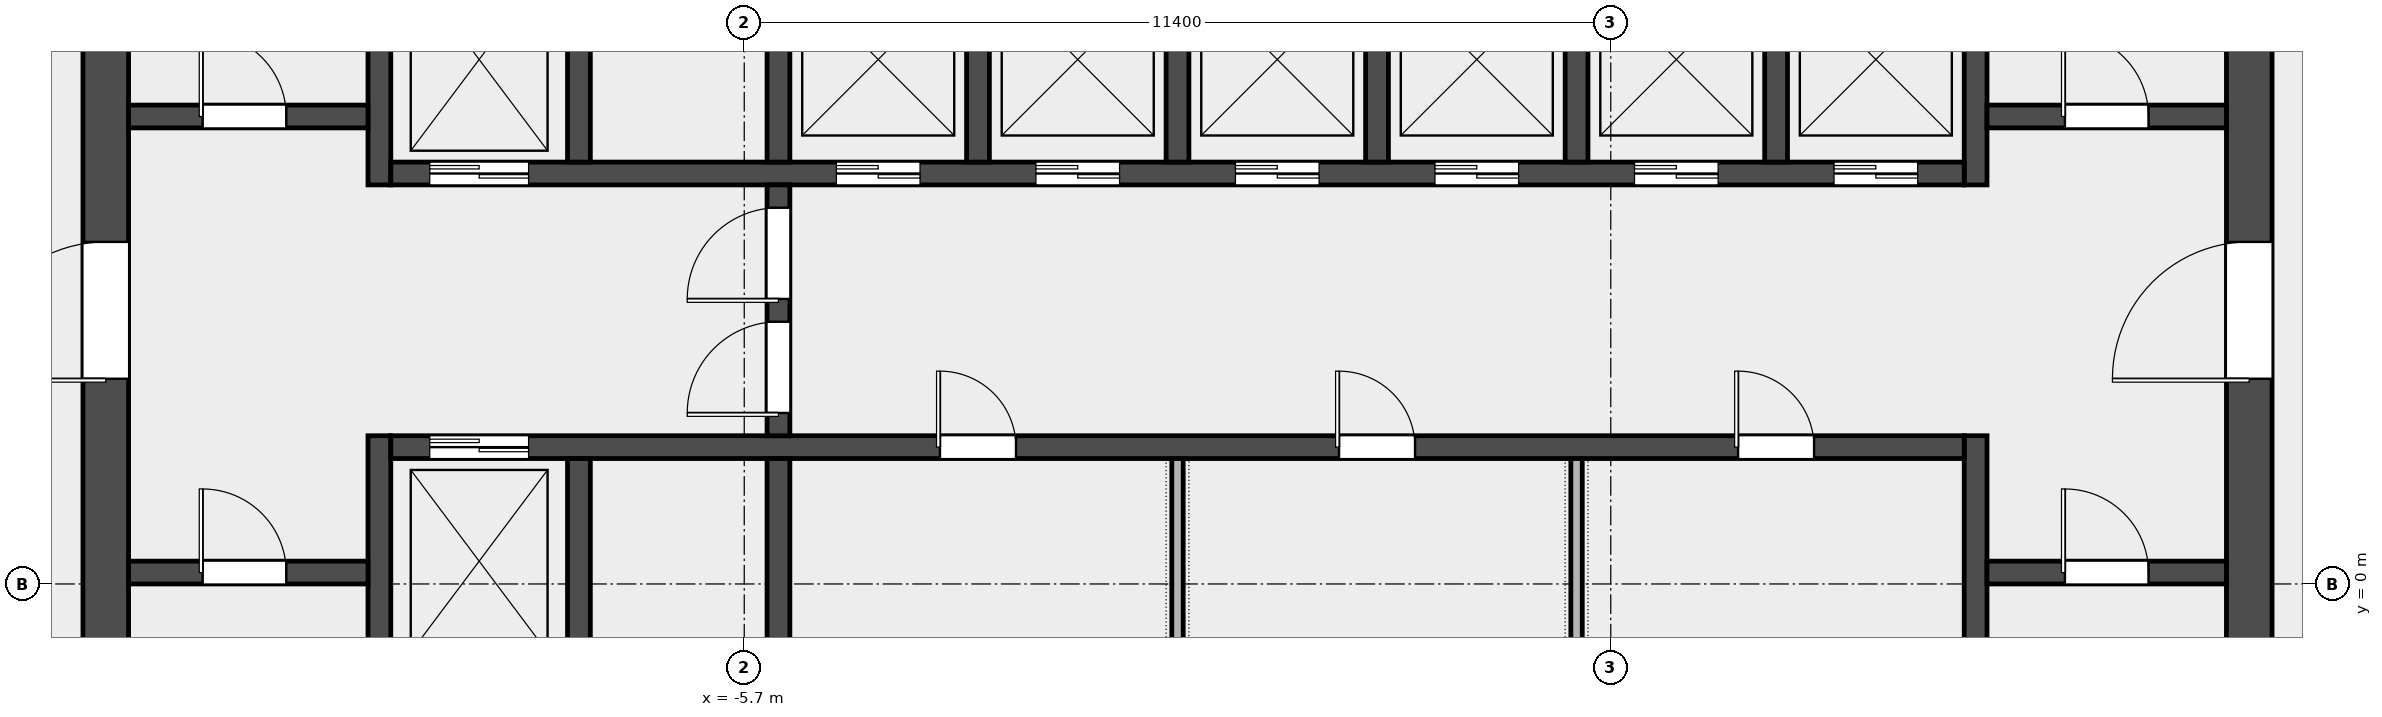
"""IFC4 building model, lengths in metres.
Left out: names, types, materials, properties, quantities, classifications, styles, units other than length and angle.
Written with IfcOpenShell. Run it as: python <this file> out.ifc"""

import sys

from ifc_helpers import new_model, si_unit, direction, frame, frame_2d, origin, place, context, subcontext, project, spatial, rectangle, extrude, element, fill, save


model = new_model("IFC4")
c1 = context("Model", 3, precision=1e-05, world=origin(), true_north=direction((0.0, 1.0)))
c2 = subcontext(c1, "Body", "Model", "MODEL_VIEW")
j1 = project(units=[si_unit("LENGTHUNIT", "METRE"), si_unit("PLANEANGLEUNIT", "RADIAN")], contexts=[c1])
p1 = place(None, origin())
s1 = spatial("IfcSite", under=j1, at=p1, CompositionType="ELEMENT")
p2 = place(p1, origin())
s2 = spatial("IfcBuilding", under=s1, at=p2, CompositionType="ELEMENT")
p3 = place(p2, frame((0.0, 0.0, 275.4)))
s3 = spatial("IfcBuildingStorey", under=s2, at=p3, CompositionType="ELEMENT", Elevation=275.4)
p4 = place(p3, frame((-14.1, -6.6, 0.0), z_axis=(0.0, 0.0, 1.0), x_axis=(0.0, 1.0, 0.0)))
e1 = element("IfcWall", 1, at=p4, inside=s3, PredefinedType="SHEAR", context=c2, shape_type="SweptSolid", body=[
    extrude(rectangle(XDim=19.5, YDim=0.6, at=frame_2d((9.75, 0.0))), origin(), (0.0, 0.0, 1.0), 3.7),
])
p5 = place(p4, frame((9.3, 0.0, 0.0)))
e2 = element("IfcOpeningElement", 2, at=p5, cuts=e1, PredefinedType="OPENING", context=c2, shape_type="SweptSolid", body=[
    extrude(rectangle(XDim=1.8, YDim=2.1, at=frame_2d((0.9, 1.05))), frame((0.0, 0.312, 0.0), z_axis=(0.0, -1.0, 0.0), x_axis=(1.0, 0.0, 0.0)), (0.0, 0.0, 1.0), 0.624),
])
p6 = place(p3, frame((14.1, -6.6, 0.0), z_axis=(0.0, 0.0, 1.0), x_axis=(0.0, 1.0, 0.0)))
e3 = element("IfcWall", 3, at=p6, inside=s3, PredefinedType="SHEAR", context=c2, shape_type="SweptSolid", body=[
    extrude(rectangle(XDim=19.5, YDim=0.6, at=frame_2d((9.75, 0.0))), origin(), (0.0, 0.0, 1.0), 3.7),
])
p7 = place(p6, frame((9.3, 0.0, 0.0)))
e4 = element("IfcOpeningElement", 4, at=p7, cuts=e3, PredefinedType="OPENING", context=c2, shape_type="SweptSolid", body=[
    extrude(rectangle(XDim=1.8, YDim=2.1, at=frame_2d((0.9, 1.05))), frame((0.0, 0.312, 0.0), z_axis=(0.0, -1.0, 0.0), x_axis=(1.0, 0.0, 0.0)), (0.0, 0.0, 1.0), 0.624),
])
p8 = place(p3, frame((-10.5, -6.6, 0.0), z_axis=(0.0, 0.0, 1.0), x_axis=(0.0, 1.0, 0.0)))
e5 = element("IfcWall", 5, at=p8, inside=s3, PredefinedType="SHEAR", context=c2, shape_type="SweptSolid", body=[
    extrude(rectangle(XDim=8.55, YDim=0.3, at=frame_2d((4.275, 0.0))), origin(), (0.0, 0.0, 1.0), 3.7),
])
p9 = place(p3, frame((-10.5, 5.25, 0.0), z_axis=(0.0, 0.0, 1.0), x_axis=(0.0, 1.0, 0.0)))
e6 = element("IfcWall", 6, at=p9, inside=s3, PredefinedType="SHEAR", context=c2, shape_type="SweptSolid", body=[
    extrude(rectangle(XDim=7.65, YDim=0.3, at=frame_2d((3.825, 0.0))), origin(), (0.0, 0.0, 1.0), 3.7),
])
p10 = place(p3, frame((10.5, -6.6, 0.0), z_axis=(0.0, 0.0, 1.0), x_axis=(0.0, 1.0, 0.0)))
e7 = element("IfcWall", 7, at=p10, inside=s3, PredefinedType="SHEAR", context=c2, shape_type="SweptSolid", body=[
    extrude(rectangle(XDim=8.55, YDim=0.3, at=frame_2d((4.275, 0.0))), origin(), (0.0, 0.0, 1.0), 3.7),
])
p11 = place(p3, frame((10.5, 5.25, 0.0), z_axis=(0.0, 0.0, 1.0), x_axis=(0.0, 1.0, 0.0)))
e8 = element("IfcWall", 8, at=p11, inside=s3, PredefinedType="SHEAR", context=c2, shape_type="SweptSolid", body=[
    extrude(rectangle(XDim=7.65, YDim=0.3, at=frame_2d((3.825, 0.0))), origin(), (0.0, 0.0, 1.0), 3.7),
])
p12 = place(p3, frame((-13.8, 0.15, 0.0), z_axis=(0.0, 0.0, 1.0), x_axis=(1.0, 0.0, 0.0)))
e9 = element("IfcWall", 9, at=p12, inside=s3, PredefinedType="SOLIDWALL", context=c2, shape_type="SweptSolid", body=[
    extrude(rectangle(XDim=3.15, YDim=0.3, at=frame_2d((1.575, 0.0))), origin(), (0.0, 0.0, 1.0), 3.7),
])
p13 = place(p12, frame((0.975, 0.0, 0.0)))
e10 = element("IfcOpeningElement", 10, at=p13, cuts=e9, PredefinedType="OPENING", context=c2, shape_type="SweptSolid", body=[
    extrude(rectangle(XDim=1.1, YDim=2.1, at=frame_2d((0.55, 1.05))), frame((0.0, 0.162, 0.0), z_axis=(0.0, -1.0, 0.0), x_axis=(1.0, 0.0, 0.0)), (0.0, 0.0, 1.0), 0.324),
])
p14 = place(p3, frame((-13.8, 6.15, 0.0), z_axis=(0.0, 0.0, 1.0), x_axis=(1.0, 0.0, 0.0)))
e11 = element("IfcWall", 11, at=p14, inside=s3, PredefinedType="SOLIDWALL", context=c2, shape_type="SweptSolid", body=[
    extrude(rectangle(XDim=3.15, YDim=0.3, at=frame_2d((1.575, 0.0))), origin(), (0.0, 0.0, 1.0), 3.7),
])
p15 = place(p14, frame((0.975, 0.0, 0.0)))
e12 = element("IfcOpeningElement", 12, at=p15, cuts=e11, PredefinedType="OPENING", context=c2, shape_type="SweptSolid", body=[
    extrude(rectangle(XDim=1.1, YDim=2.1, at=frame_2d((0.55, 1.05))), frame((0.0, 0.162, 0.0), z_axis=(0.0, -1.0, 0.0), x_axis=(1.0, 0.0, 0.0)), (0.0, 0.0, 1.0), 0.324),
])
p16 = place(p3, frame((10.65, 0.15, 0.0), z_axis=(0.0, 0.0, 1.0), x_axis=(1.0, 0.0, 0.0)))
e13 = element("IfcWall", 13, at=p16, inside=s3, PredefinedType="SOLIDWALL", context=c2, shape_type="SweptSolid", body=[
    extrude(rectangle(XDim=3.15, YDim=0.3, at=frame_2d((1.575, 0.0))), origin(), (0.0, 0.0, 1.0), 3.7),
])
p17 = place(p16, frame((1.025, 0.0, 0.0)))
e14 = element("IfcOpeningElement", 14, at=p17, cuts=e13, PredefinedType="OPENING", context=c2, shape_type="SweptSolid", body=[
    extrude(rectangle(XDim=1.1, YDim=2.1, at=frame_2d((0.55, 1.05))), frame((0.0, 0.162, 0.0), z_axis=(0.0, -1.0, 0.0), x_axis=(1.0, 0.0, 0.0)), (0.0, 0.0, 1.0), 0.324),
])
p18 = place(p3, frame((10.65, 6.15, 0.0), z_axis=(0.0, 0.0, 1.0), x_axis=(1.0, 0.0, 0.0)))
e15 = element("IfcWall", 15, at=p18, inside=s3, PredefinedType="SOLIDWALL", context=c2, shape_type="SweptSolid", body=[
    extrude(rectangle(XDim=3.15, YDim=0.3, at=frame_2d((1.575, 0.0))), origin(), (0.0, 0.0, 1.0), 3.7),
])
p19 = place(p18, frame((1.025, 0.0, 0.0)))
e16 = element("IfcOpeningElement", 16, at=p19, cuts=e15, PredefinedType="OPENING", context=c2, shape_type="SweptSolid", body=[
    extrude(rectangle(XDim=1.1, YDim=2.1, at=frame_2d((0.55, 1.05))), frame((0.0, 0.162, 0.0), z_axis=(0.0, -1.0, 0.0), x_axis=(1.0, 0.0, 0.0)), (0.0, 0.0, 1.0), 0.324),
])
p20 = place(p3, frame((-10.35, 1.8, 0.0), z_axis=(0.0, 0.0, 1.0), x_axis=(1.0, 0.0, 0.0)))
e17 = element("IfcWall", 17, at=p20, inside=s3, PredefinedType="SOLIDWALL", context=c2, shape_type="SweptSolid", body=[
    extrude(rectangle(XDim=20.7, YDim=0.3, at=frame_2d((10.35, 0.0))), origin(), (0.0, 0.0, 1.0), 3.7),
])
p21 = place(p20, frame((0.512, 0.0, 0.0)))
e18 = element("IfcOpeningElement", 18, at=p21, cuts=e17, PredefinedType="OPENING", context=c2, shape_type="SweptSolid", body=[
    extrude(rectangle(XDim=1.3, YDim=2.1, at=frame_2d((0.65, 1.05))), frame((0.0, 0.162, 0.0), z_axis=(0.0, -1.0, 0.0), x_axis=(1.0, 0.0, 0.0)), (0.0, 0.0, 1.0), 0.324),
])
p22 = place(p20, frame((7.225, 0.0, 0.0)))
e19 = element("IfcOpeningElement", 19, at=p22, cuts=e17, PredefinedType="OPENING", context=c2, shape_type="SweptSolid", body=[
    extrude(rectangle(XDim=1.0, YDim=2.1, at=frame_2d((0.5, 1.05))), frame((0.0, 0.162, 0.0), z_axis=(0.0, -1.0, 0.0), x_axis=(1.0, 0.0, 0.0)), (0.0, 0.0, 1.0), 0.324),
])
p23 = place(p20, frame((12.475, 0.0, 0.0)))
e20 = element("IfcOpeningElement", 20, at=p23, cuts=e17, PredefinedType="OPENING", context=c2, shape_type="SweptSolid", body=[
    extrude(rectangle(XDim=1.0, YDim=2.1, at=frame_2d((0.5, 1.05))), frame((0.0, 0.162, 0.0), z_axis=(0.0, -1.0, 0.0), x_axis=(1.0, 0.0, 0.0)), (0.0, 0.0, 1.0), 0.324),
])
p24 = place(p20, frame((17.725, 0.0, 0.0)))
e21 = element("IfcOpeningElement", 21, at=p24, cuts=e17, PredefinedType="OPENING", context=c2, shape_type="SweptSolid", body=[
    extrude(rectangle(XDim=1.0, YDim=2.1, at=frame_2d((0.5, 1.05))), frame((0.0, 0.162, 0.0), z_axis=(0.0, -1.0, 0.0), x_axis=(1.0, 0.0, 0.0)), (0.0, 0.0, 1.0), 0.324),
])
p25 = place(p3, frame((-10.35, 5.4, 0.0), z_axis=(0.0, 0.0, 1.0), x_axis=(1.0, 0.0, 0.0)))
e22 = element("IfcWall", 22, at=p25, inside=s3, PredefinedType="SOLIDWALL", context=c2, shape_type="SweptSolid", body=[
    extrude(rectangle(XDim=20.7, YDim=0.3, at=frame_2d((10.35, 0.0))), origin(), (0.0, 0.0, 1.0), 3.7),
])
p26 = place(p25, frame((0.512, 0.0, 0.0)))
e23 = element("IfcOpeningElement", 23, at=p26, cuts=e22, PredefinedType="OPENING", context=c2, shape_type="SweptSolid", body=[
    extrude(rectangle(XDim=1.3, YDim=2.1, at=frame_2d((0.65, 1.05))), frame((0.0, 0.162, 0.0), z_axis=(0.0, -1.0, 0.0), x_axis=(1.0, 0.0, 0.0)), (0.0, 0.0, 1.0), 0.324),
])
p27 = place(p25, frame((5.863, 0.0, 0.0)))
e24 = element("IfcOpeningElement", 24, at=p27, cuts=e22, PredefinedType="OPENING", context=c2, shape_type="SweptSolid", body=[
    extrude(rectangle(XDim=1.1, YDim=2.1, at=frame_2d((0.55, 1.05))), frame((0.0, 0.162, 0.0), z_axis=(0.0, -1.0, 0.0), x_axis=(1.0, 0.0, 0.0)), (0.0, 0.0, 1.0), 0.324),
])
p28 = place(p25, frame((8.488, 0.0, 0.0)))
e25 = element("IfcOpeningElement", 25, at=p28, cuts=e22, PredefinedType="OPENING", context=c2, shape_type="SweptSolid", body=[
    extrude(rectangle(XDim=1.1, YDim=2.1, at=frame_2d((0.55, 1.05))), frame((0.0, 0.162, 0.0), z_axis=(0.0, -1.0, 0.0), x_axis=(1.0, 0.0, 0.0)), (0.0, 0.0, 1.0), 0.324),
])
p29 = place(p25, frame((11.113, 0.0, 0.0)))
e26 = element("IfcOpeningElement", 26, at=p29, cuts=e22, PredefinedType="OPENING", context=c2, shape_type="SweptSolid", body=[
    extrude(rectangle(XDim=1.1, YDim=2.1, at=frame_2d((0.55, 1.05))), frame((0.0, 0.162, 0.0), z_axis=(0.0, -1.0, 0.0), x_axis=(1.0, 0.0, 0.0)), (0.0, 0.0, 1.0), 0.324),
])
p30 = place(p25, frame((13.738, 0.0, 0.0)))
e27 = element("IfcOpeningElement", 27, at=p30, cuts=e22, PredefinedType="OPENING", context=c2, shape_type="SweptSolid", body=[
    extrude(rectangle(XDim=1.1, YDim=2.1, at=frame_2d((0.55, 1.05))), frame((0.0, 0.162, 0.0), z_axis=(0.0, -1.0, 0.0), x_axis=(1.0, 0.0, 0.0)), (0.0, 0.0, 1.0), 0.324),
])
p31 = place(p25, frame((16.363, 0.0, 0.0)))
e28 = element("IfcOpeningElement", 28, at=p31, cuts=e22, PredefinedType="OPENING", context=c2, shape_type="SweptSolid", body=[
    extrude(rectangle(XDim=1.1, YDim=2.1, at=frame_2d((0.55, 1.05))), frame((0.0, 0.162, 0.0), z_axis=(0.0, -1.0, 0.0), x_axis=(1.0, 0.0, 0.0)), (0.0, 0.0, 1.0), 0.324),
])
p32 = place(p25, frame((18.988, 0.0, 0.0)))
e29 = element("IfcOpeningElement", 29, at=p32, cuts=e22, PredefinedType="OPENING", context=c2, shape_type="SweptSolid", body=[
    extrude(rectangle(XDim=1.1, YDim=2.1, at=frame_2d((0.55, 1.05))), frame((0.0, 0.162, 0.0), z_axis=(0.0, -1.0, 0.0), x_axis=(1.0, 0.0, 0.0)), (0.0, 0.0, 1.0), 0.324),
])
for number, where, z_axis, x_axis in (
    (30, (-7.875, -1.05, 0.0), (0.0, 0.0, 1.0), (0.0, 1.0, 0.0)),
    (31, (-5.25, -1.05, 0.0), (0.0, 0.0, 1.0), (0.0, 1.0, 0.0)),
    (32, (-7.875, 5.55, 0.0), (0.0, 0.0, 1.0), (0.0, 1.0, 0.0)),
    (33, (-5.25, 5.55, 0.0), (0.0, 0.0, 1.0), (0.0, 1.0, 0.0)),
    (34, (-2.625, 5.55, 0.0), (0.0, 0.0, 1.0), (0.0, 1.0, 0.0)),
    (35, (0.0, 5.55, 0.0), (0.0, 0.0, 1.0), (0.0, 1.0, 0.0)),
    (36, (2.625, 5.55, 0.0), (0.0, 0.0, 1.0), (0.0, 1.0, 0.0)),
    (37, (5.25, 5.55, 0.0), (0.0, 0.0, 1.0), (0.0, 1.0, 0.0)),
    (38, (7.875, 5.55, 0.0), (0.0, 0.0, 1.0), (0.0, 1.0, 0.0)),
):
    element("IfcWall", number, at=place(p3, frame(where, z_axis=z_axis, x_axis=x_axis)), inside=s3, PredefinedType="SOLIDWALL", context=c2, shape_type="SweptSolid", body=[
        extrude(rectangle(XDim=2.7, YDim=0.3, at=frame_2d((1.35, 0.0))), origin(), (0.0, 0.0, 1.0), 3.7),
    ])
p33 = place(p3, frame((-5.25, 1.95, 0.0), z_axis=(0.0, 0.0, 1.0), x_axis=(0.0, 1.0, 0.0)))
e39 = element("IfcWall", 39, at=p33, inside=s3, PredefinedType="SOLIDWALL", context=c2, shape_type="SweptSolid", body=[
    extrude(rectangle(XDim=3.3, YDim=0.3, at=frame_2d((1.65, 0.0))), origin(), (0.0, 0.0, 1.0), 3.7),
])
p34 = place(p33, frame((0.3, 0.0, 0.0)))
e40 = element("IfcOpeningElement", 40, at=p34, cuts=e39, PredefinedType="OPENING", context=c2, shape_type="SweptSolid", body=[
    extrude(rectangle(XDim=1.2, YDim=2.1, at=frame_2d((0.6, 1.05))), frame((0.0, 0.162, 0.0), z_axis=(0.0, -1.0, 0.0), x_axis=(1.0, 0.0, 0.0)), (0.0, 0.0, 1.0), 0.324),
])
p35 = place(p33, frame((1.8, 0.0, 0.0)))
e41 = element("IfcOpeningElement", 41, at=p35, cuts=e39, PredefinedType="OPENING", context=c2, shape_type="SweptSolid", body=[
    extrude(rectangle(XDim=1.2, YDim=2.1, at=frame_2d((0.6, 1.05))), frame((0.0, 0.162, 0.0), z_axis=(0.0, -1.0, 0.0), x_axis=(1.0, 0.0, 0.0)), (0.0, 0.0, 1.0), 0.324),
])
for number, where, z_axis, x_axis in (
    (42, (0.0, -1.05, 0.0), (0.0, 0.0, 1.0), (0.0, 1.0, 0.0)),
    (43, (5.25, -1.05, 0.0), (0.0, 0.0, 1.0), (0.0, 1.0, 0.0)),
):
    element("IfcWall", number, at=place(p3, frame(where, z_axis=z_axis, x_axis=x_axis)), inside=s3, PredefinedType="PARTITIONING", context=c2, shape_type="SweptSolid", body=[
        extrude(rectangle(XDim=2.7, YDim=0.15, at=frame_2d((1.35, 0.0))), origin(), (0.0, 0.0, 1.0), 3.7),
    ])
p36 = place(p13, origin())
e44 = element("IfcDoor", 44, at=p36, inside=s3, OperationType="SINGLE_SWING_LEFT", PredefinedType="DOOR", context=c2, shape_type="SweptSolid", body=[
    extrude(rectangle(XDim=1.1, YDim=2.1, at=frame_2d((0.55, 1.05))), frame((0.0, 0.025, 0.0), z_axis=(0.0, -1.0, 0.0), x_axis=(1.0, 0.0, 0.0)), (0.0, 0.0, 1.0), 0.05),
])
fill(e10, e44)
p37 = place(p15, origin())
e45 = element("IfcDoor", 45, at=p37, inside=s3, OperationType="SINGLE_SWING_LEFT", PredefinedType="DOOR", context=c2, shape_type="SweptSolid", body=[
    extrude(rectangle(XDim=1.1, YDim=2.1, at=frame_2d((0.55, 1.05))), frame((0.0, 0.025, 0.0), z_axis=(0.0, -1.0, 0.0), x_axis=(1.0, 0.0, 0.0)), (0.0, 0.0, 1.0), 0.05),
])
fill(e12, e45)
p38 = place(p17, origin())
e46 = element("IfcDoor", 46, at=p38, inside=s3, OperationType="SINGLE_SWING_RIGHT", PredefinedType="DOOR", context=c2, shape_type="SweptSolid", body=[
    extrude(rectangle(XDim=1.1, YDim=2.1, at=frame_2d((0.55, 1.05))), frame((0.0, 0.025, 0.0), z_axis=(0.0, -1.0, 0.0), x_axis=(1.0, 0.0, 0.0)), (0.0, 0.0, 1.0), 0.05),
])
fill(e14, e46)
p39 = place(p19, origin())
e47 = element("IfcDoor", 47, at=p39, inside=s3, OperationType="SINGLE_SWING_RIGHT", PredefinedType="DOOR", context=c2, shape_type="SweptSolid", body=[
    extrude(rectangle(XDim=1.1, YDim=2.1, at=frame_2d((0.55, 1.05))), frame((0.0, 0.025, 0.0), z_axis=(0.0, -1.0, 0.0), x_axis=(1.0, 0.0, 0.0)), (0.0, 0.0, 1.0), 0.05),
])
fill(e16, e47)
p40 = place(p5, origin())
e48 = element("IfcDoor", 48, at=p40, inside=s3, OperationType="DOUBLE_DOOR_SINGLE_SWING", PredefinedType="DOOR", context=c2, shape_type="SweptSolid", body=[
    extrude(rectangle(XDim=1.8, YDim=2.1, at=frame_2d((0.9, 1.05))), frame((0.0, 0.025, 0.0), z_axis=(0.0, -1.0, 0.0), x_axis=(1.0, 0.0, 0.0)), (0.0, 0.0, 1.0), 0.05),
])
fill(e2, e48)
p41 = place(p7, origin())
e49 = element("IfcDoor", 49, at=p41, inside=s3, OperationType="DOUBLE_DOOR_SINGLE_SWING", PredefinedType="DOOR", context=c2, shape_type="SweptSolid", body=[
    extrude(rectangle(XDim=1.8, YDim=2.1, at=frame_2d((0.9, 1.05))), frame((0.0, 0.025, 0.0), z_axis=(0.0, -1.0, 0.0), x_axis=(1.0, 0.0, 0.0)), (0.0, 0.0, 1.0), 0.05),
])
fill(e4, e49)
p42 = place(p34, origin())
e50 = element("IfcDoor", 50, at=p42, inside=s3, OperationType="SINGLE_SWING_LEFT", PredefinedType="DOOR", context=c2, shape_type="SweptSolid", body=[
    extrude(rectangle(XDim=1.2, YDim=2.1, at=frame_2d((0.6, 1.05))), frame((0.0, 0.025, 0.0), z_axis=(0.0, -1.0, 0.0), x_axis=(1.0, 0.0, 0.0)), (0.0, 0.0, 1.0), 0.05),
])
fill(e40, e50)
p43 = place(p35, origin())
e51 = element("IfcDoor", 51, at=p43, inside=s3, OperationType="SINGLE_SWING_RIGHT", PredefinedType="DOOR", context=c2, shape_type="SweptSolid", body=[
    extrude(rectangle(XDim=1.2, YDim=2.1, at=frame_2d((0.6, 1.05))), frame((0.0, 0.025, 0.0), z_axis=(0.0, -1.0, 0.0), x_axis=(1.0, 0.0, 0.0)), (0.0, 0.0, 1.0), 0.05),
])
fill(e41, e51)
p44 = place(p21, origin())
e52 = element("IfcDoor", 52, at=p44, inside=s3, OperationType="DOUBLE_DOOR_SLIDING", PredefinedType="DOOR", context=c2, shape_type="SweptSolid", body=[
    extrude(rectangle(XDim=1.3, YDim=2.1, at=frame_2d((0.65, 1.05))), frame((0.0, 0.025, 0.0), z_axis=(0.0, -1.0, 0.0), x_axis=(1.0, 0.0, 0.0)), (0.0, 0.0, 1.0), 0.05),
])
fill(e18, e52)
p45 = place(p26, origin())
e53 = element("IfcDoor", 53, at=p45, inside=s3, OperationType="DOUBLE_DOOR_SLIDING", PredefinedType="DOOR", context=c2, shape_type="SweptSolid", body=[
    extrude(rectangle(XDim=1.3, YDim=2.1, at=frame_2d((0.65, 1.05))), frame((0.0, 0.025, 0.0), z_axis=(0.0, -1.0, 0.0), x_axis=(1.0, 0.0, 0.0)), (0.0, 0.0, 1.0), 0.05),
])
fill(e23, e53)
p46 = place(p27, origin())
e54 = element("IfcDoor", 54, at=p46, inside=s3, OperationType="DOUBLE_DOOR_SLIDING", PredefinedType="DOOR", context=c2, shape_type="SweptSolid", body=[
    extrude(rectangle(XDim=1.1, YDim=2.1, at=frame_2d((0.55, 1.05))), frame((0.0, 0.025, 0.0), z_axis=(0.0, -1.0, 0.0), x_axis=(1.0, 0.0, 0.0)), (0.0, 0.0, 1.0), 0.05),
])
fill(e24, e54)
p47 = place(p28, origin())
e55 = element("IfcDoor", 55, at=p47, inside=s3, OperationType="DOUBLE_DOOR_SLIDING", PredefinedType="DOOR", context=c2, shape_type="SweptSolid", body=[
    extrude(rectangle(XDim=1.1, YDim=2.1, at=frame_2d((0.55, 1.05))), frame((0.0, 0.025, 0.0), z_axis=(0.0, -1.0, 0.0), x_axis=(1.0, 0.0, 0.0)), (0.0, 0.0, 1.0), 0.05),
])
fill(e25, e55)
p48 = place(p29, origin())
e56 = element("IfcDoor", 56, at=p48, inside=s3, OperationType="DOUBLE_DOOR_SLIDING", PredefinedType="DOOR", context=c2, shape_type="SweptSolid", body=[
    extrude(rectangle(XDim=1.1, YDim=2.1, at=frame_2d((0.55, 1.05))), frame((0.0, 0.025, 0.0), z_axis=(0.0, -1.0, 0.0), x_axis=(1.0, 0.0, 0.0)), (0.0, 0.0, 1.0), 0.05),
])
fill(e26, e56)
p49 = place(p30, origin())
e57 = element("IfcDoor", 57, at=p49, inside=s3, OperationType="DOUBLE_DOOR_SLIDING", PredefinedType="DOOR", context=c2, shape_type="SweptSolid", body=[
    extrude(rectangle(XDim=1.1, YDim=2.1, at=frame_2d((0.55, 1.05))), frame((0.0, 0.025, 0.0), z_axis=(0.0, -1.0, 0.0), x_axis=(1.0, 0.0, 0.0)), (0.0, 0.0, 1.0), 0.05),
])
fill(e27, e57)
p50 = place(p31, origin())
e58 = element("IfcDoor", 58, at=p50, inside=s3, OperationType="DOUBLE_DOOR_SLIDING", PredefinedType="DOOR", context=c2, shape_type="SweptSolid", body=[
    extrude(rectangle(XDim=1.1, YDim=2.1, at=frame_2d((0.55, 1.05))), frame((0.0, 0.025, 0.0), z_axis=(0.0, -1.0, 0.0), x_axis=(1.0, 0.0, 0.0)), (0.0, 0.0, 1.0), 0.05),
])
fill(e28, e58)
p51 = place(p32, origin())
e59 = element("IfcDoor", 59, at=p51, inside=s3, OperationType="DOUBLE_DOOR_SLIDING", PredefinedType="DOOR", context=c2, shape_type="SweptSolid", body=[
    extrude(rectangle(XDim=1.1, YDim=2.1, at=frame_2d((0.55, 1.05))), frame((0.0, 0.025, 0.0), z_axis=(0.0, -1.0, 0.0), x_axis=(1.0, 0.0, 0.0)), (0.0, 0.0, 1.0), 0.05),
])
fill(e29, e59)
p52 = place(p22, origin())
e60 = element("IfcDoor", 60, at=p52, inside=s3, OperationType="SINGLE_SWING_LEFT", PredefinedType="DOOR", context=c2, shape_type="SweptSolid", body=[
    extrude(rectangle(XDim=1.0, YDim=2.1, at=frame_2d((0.5, 1.05))), frame((0.0, 0.025, 0.0), z_axis=(0.0, -1.0, 0.0), x_axis=(1.0, 0.0, 0.0)), (0.0, 0.0, 1.0), 0.05),
])
fill(e19, e60)
p53 = place(p23, origin())
e61 = element("IfcDoor", 61, at=p53, inside=s3, OperationType="SINGLE_SWING_LEFT", PredefinedType="DOOR", context=c2, shape_type="SweptSolid", body=[
    extrude(rectangle(XDim=1.0, YDim=2.1, at=frame_2d((0.5, 1.05))), frame((0.0, 0.025, 0.0), z_axis=(0.0, -1.0, 0.0), x_axis=(1.0, 0.0, 0.0)), (0.0, 0.0, 1.0), 0.05),
])
fill(e20, e61)
p54 = place(p24, origin())
e62 = element("IfcDoor", 62, at=p54, inside=s3, OperationType="SINGLE_SWING_LEFT", PredefinedType="DOOR", context=c2, shape_type="SweptSolid", body=[
    extrude(rectangle(XDim=1.0, YDim=2.1, at=frame_2d((0.5, 1.05))), frame((0.0, 0.025, 0.0), z_axis=(0.0, -1.0, 0.0), x_axis=(1.0, 0.0, 0.0)), (0.0, 0.0, 1.0), 0.05),
])
fill(e21, e62)
save(model, sys.argv[1])
